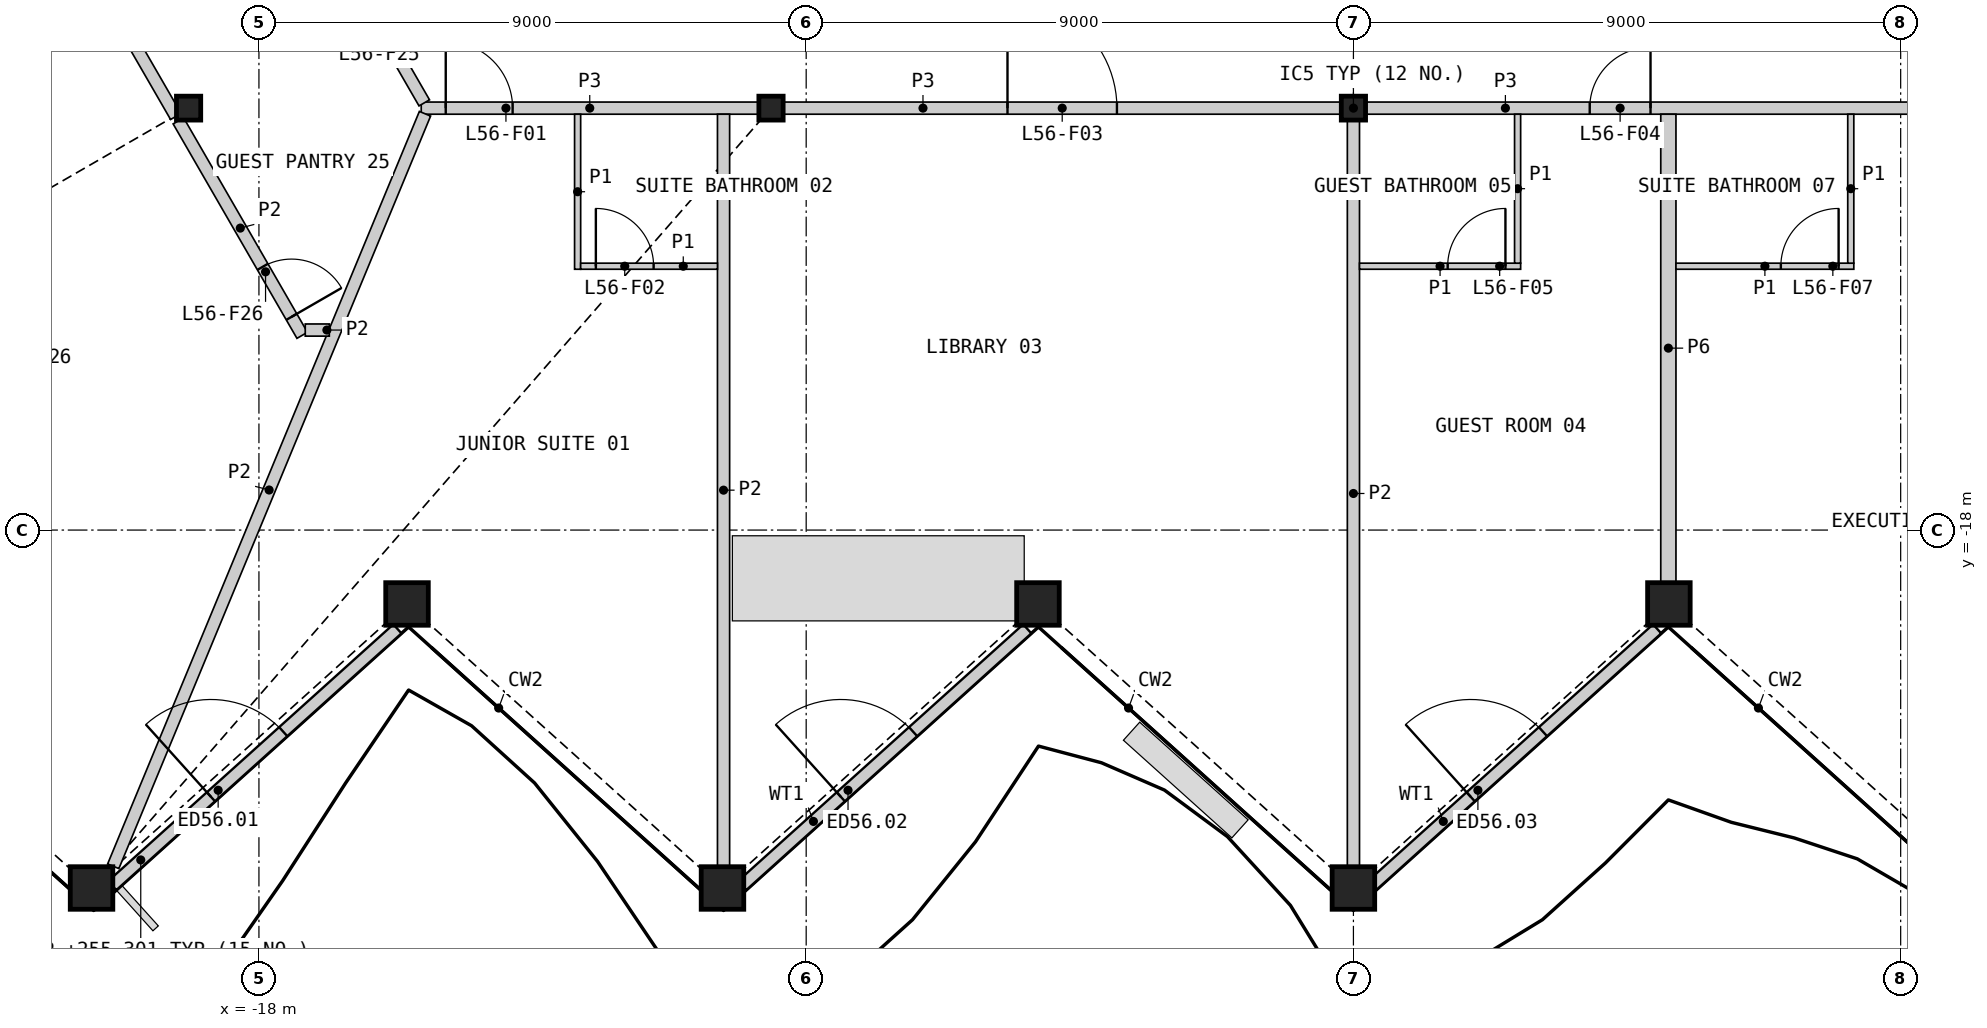
"""IFC4 building model, lengths in metres.
Left out: names, types, materials, properties, quantities, classifications, styles, units other than length and angle.
Written with IfcOpenShell. Run it as: python <this file> out.ifc"""

import sys

from ifc_helpers import new_model, si_unit, direction, frame, frame_2d, origin, origin_2d, place, context, subcontext, project, spatial, rectangle, hollow_rectangle, i_section, extrude, element, fill, save


model = new_model("IFC4")
c1 = context("Model", 3, precision=1e-05, world=origin(), true_north=direction((0.0, 1.0)))
c2 = subcontext(c1, "Body", "Model", "MODEL_VIEW")
j1 = project(units=[si_unit("LENGTHUNIT", "METRE"), si_unit("PLANEANGLEUNIT", "RADIAN")], contexts=[c1])
p1 = place(None, origin())
s1 = spatial("IfcSite", under=j1, at=p1, CompositionType="ELEMENT")
p2 = place(p1, origin())
s2 = spatial("IfcBuilding", under=s1, at=p2, CompositionType="ELEMENT")
p3 = place(p2, frame((0.0, 0.0, 252.6)))
s3 = spatial("IfcBuildingStorey", under=s2, at=p3, CompositionType="ELEMENT", Elevation=252.6)
for number, where, z_axis, x_axis in (
    (1, (-20.753, -23.887, 0.0), (0.0, 0.0, 1.0), (1.0, 0.0, 0.0)),
    (2, (-15.565, -19.215, 0.0), (0.0, 0.0, 1.0), (1.0, 0.0, 0.0)),
    (3, (-10.376, -23.887, 0.0), (0.0, 0.0, 1.0), (1.0, 0.0, 0.0)),
    (4, (-5.188, -19.215, 0.0), (0.0, 0.0, 1.0), (1.0, 0.0, 0.0)),
    (5, (0.0, -23.887, 0.0), (0.0, 0.0, 1.0), (1.0, 0.0, 0.0)),
    (6, (5.188, -19.215, 0.0), (0.0, 0.0, 1.0), (1.0, 0.0, 0.0)),
):
    element("IfcColumn", number, at=place(p3, frame(where, z_axis=z_axis, x_axis=x_axis)), inside=s3, PredefinedType="COLUMN", context=c2, shape_type="SweptSolid", body=[
        extrude(hollow_rectangle(XDim=0.7, YDim=0.7, WallThickness=0.045, at=origin_2d()), origin(), (0.0, 0.0, 1.0), 3.6),
    ])
for number, where, z_axis, x_axis in (
    (7, (-19.157, -11.06, 0.0), (0.0, 0.0, 1.0), (1.0, 0.0, 0.0)),
    (8, (-9.578, -11.06, 0.0), (0.0, 0.0, 1.0), (1.0, 0.0, 0.0)),
    (9, (0.0, -11.06, 0.0), (0.0, 0.0, 1.0), (1.0, 0.0, 0.0)),
):
    element("IfcColumn", number, at=place(p3, frame(where, z_axis=z_axis, x_axis=x_axis)), inside=s3, PredefinedType="COLUMN", context=c2, shape_type="SweptSolid", body=[
        extrude(i_section(OverallWidth=0.399, OverallDepth=0.393, WebThickness=0.023, FlangeThickness=0.037, at=origin_2d()), origin(), (0.0, 0.0, 1.0), 3.6),
    ])
p4 = place(p3, frame((-20.413, -23.848, 0.0), z_axis=(0.0, 0.0, 1.0), x_axis=(0.74314024121, 0.669135697668, 0.0)))
e10 = element("IfcWall", 10, at=p4, inside=s3, PredefinedType="SOLIDWALL", context=c2, shape_type="SweptSolid", body=[
    extrude(rectangle(XDim=6.311, YDim=0.2, at=frame_2d((3.156, 0.0))), origin(), (0.0, 0.0, 1.0), 2.701),
])
p5 = place(p4, frame((2.184, 0.0, 0.0)))
e11 = element("IfcOpeningElement", 11, at=p5, cuts=e10, PredefinedType="OPENING", context=c2, shape_type="SweptSolid", body=[
    extrude(rectangle(XDim=1.6, YDim=2.4, at=frame_2d((0.8, 1.2))), frame((0.0, 0.11, 0.0), z_axis=(0.0, -1.0, 0.0), x_axis=(1.0, 0.0, 0.0)), (0.0, 0.0, 1.0), 0.22),
])
p6 = place(p3, frame((-10.054, -23.848, 0.0), z_axis=(0.0, 0.0, 1.0), x_axis=(0.74314024121, 0.669135697668, 0.0)))
e12 = element("IfcWall", 12, at=p6, inside=s3, PredefinedType="SOLIDWALL", context=c2, shape_type="SweptSolid", body=[
    extrude(rectangle(XDim=6.311, YDim=0.2, at=frame_2d((3.156, 0.0))), origin(), (0.0, 0.0, 1.0), 2.701),
])
p7 = place(p6, frame((2.184, 0.0, 0.0)))
e13 = element("IfcOpeningElement", 13, at=p7, cuts=e12, PredefinedType="OPENING", context=c2, shape_type="SweptSolid", body=[
    extrude(rectangle(XDim=1.6, YDim=2.4, at=frame_2d((0.8, 1.2))), frame((0.0, 0.11, 0.0), z_axis=(0.0, -1.0, 0.0), x_axis=(1.0, 0.0, 0.0)), (0.0, 0.0, 1.0), 0.22),
])
p8 = place(p3, frame((0.305, -23.848, 0.0), z_axis=(0.0, 0.0, 1.0), x_axis=(0.74314024121, 0.669135697668, 0.0)))
e14 = element("IfcWall", 14, at=p8, inside=s3, PredefinedType="SOLIDWALL", context=c2, shape_type="SweptSolid", body=[
    extrude(rectangle(XDim=6.311, YDim=0.2, at=frame_2d((3.156, 0.0))), origin(), (0.0, 0.0, 1.0), 2.701),
])
p9 = place(p8, frame((2.184, 0.0, 0.0)))
e15 = element("IfcOpeningElement", 15, at=p9, cuts=e14, PredefinedType="OPENING", context=c2, shape_type="SweptSolid", body=[
    extrude(rectangle(XDim=1.6, YDim=2.4, at=frame_2d((0.8, 1.2))), frame((0.0, 0.11, 0.0), z_axis=(0.0, -1.0, 0.0), x_axis=(1.0, 0.0, 0.0)), (0.0, 0.0, 1.0), 0.22),
])
p10 = place(p3, frame((-9.369, -11.06, 0.0), z_axis=(0.0, 0.0, 1.0), x_axis=(1.0, 0.0, 0.0)))
e16 = element("IfcWall", 16, at=p10, inside=s3, PredefinedType="PARTITIONING", context=c2, shape_type="SweptSolid", body=[
    extrude(rectangle(XDim=9.159, YDim=0.2, at=frame_2d((4.58, 0.0))), origin(), (0.0, 0.0, 1.0), 3.25),
])
p11 = place(p10, frame((3.68, 0.0, 0.0)))
e17 = element("IfcOpeningElement", 17, at=p11, cuts=e16, PredefinedType="OPENING", context=c2, shape_type="SweptSolid", body=[
    extrude(rectangle(XDim=1.8, YDim=2.1, at=frame_2d((0.9, 1.05))), frame((0.0, 0.11, 0.0), z_axis=(0.0, -1.0, 0.0), x_axis=(1.0, 0.0, 0.0)), (0.0, 0.0, 1.0), 0.22),
])
p12 = place(p3, frame((0.209, -11.06, 0.0), z_axis=(0.0, 0.0, 1.0), x_axis=(1.0, 0.0, 0.0)))
e18 = element("IfcWall", 18, at=p12, inside=s3, PredefinedType="PARTITIONING", context=c2, shape_type="SweptSolid", body=[
    extrude(rectangle(XDim=9.159, YDim=0.2, at=frame_2d((4.58, 0.0))), origin(), (0.0, 0.0, 1.0), 3.25),
])
p13 = place(p12, frame((3.677, 0.0, 0.0)))
e19 = element("IfcOpeningElement", 19, at=p13, cuts=e18, PredefinedType="OPENING", context=c2, shape_type="SweptSolid", body=[
    extrude(rectangle(XDim=1.0, YDim=2.1, at=frame_2d((0.5, 1.05))), frame((0.0, 0.11, 0.0), z_axis=(0.0, -1.0, 0.0), x_axis=(1.0, 0.0, 0.0)), (0.0, 0.0, 1.0), 0.22),
])
p14 = place(p3, frame((5.179, -18.855, 0.0), z_axis=(0.0, 0.0, 1.0), x_axis=(0.0, 1.0, 0.0)))
e20 = element("IfcWall", 20, at=p14, inside=s3, PredefinedType="PARTITIONING", context=c2, shape_type="SweptSolid", body=[
    extrude(rectangle(XDim=7.695, YDim=0.25, at=frame_2d((3.848, 0.0))), origin(), (0.0, 0.0, 1.0), 2.404),
])
p15 = place(p3, frame((-15.331, -11.06, 0.0), z_axis=(0.0, 0.0, 1.0), x_axis=(1.0, 0.0, 0.0)))
e21 = element("IfcWall", 21, at=p15, inside=s3, PredefinedType="PARTITIONING", context=c2, shape_type="SweptSolid", body=[
    extrude(rectangle(XDim=5.543, YDim=0.2, at=frame_2d((2.771, 0.0))), origin(), (0.0, 0.0, 1.0), 3.25),
])
p16 = place(p15, frame((0.403, 0.0, 0.0)))
e22 = element("IfcOpeningElement", 22, at=p16, cuts=e21, PredefinedType="OPENING", context=c2, shape_type="SweptSolid", body=[
    extrude(rectangle(XDim=1.1, YDim=2.1, at=frame_2d((0.55, 1.05))), frame((0.0, 0.11, 0.0), z_axis=(0.0, -1.0, 0.0), x_axis=(1.0, 0.0, 0.0)), (0.0, 0.0, 1.0), 0.22),
])
p17 = place(p3, frame((-17.144, -7.747, 0.0), z_axis=(0.0, 0.0, 1.0), x_axis=(0.499958791762, -0.866049194065, 0.0)))
e23 = element("IfcWall", 23, at=p17, inside=s3, PredefinedType="PARTITIONING", context=c2, shape_type="SweptSolid", body=[
    extrude(rectangle(XDim=3.726, YDim=0.2, at=frame_2d((1.863, 0.0))), origin(), (0.0, 0.0, 1.0), 3.25),
])
p18 = place(p17, frame((1.388, 0.0, 0.0)))
e24 = element("IfcOpeningElement", 24, at=p18, cuts=e23, PredefinedType="OPENING", context=c2, shape_type="SweptSolid", body=[
    extrude(rectangle(XDim=0.95, YDim=2.1, at=frame_2d((0.475, 1.05))), frame((0.0, 0.11, 0.0), z_axis=(0.0, -1.0, 0.0), x_axis=(1.0, 0.0, 0.0)), (0.0, 0.0, 1.0), 0.22),
])
p19 = place(p3, frame((-20.396, -23.53, 0.0), z_axis=(0.0, 0.0, 1.0), x_axis=(0.382692998932, 0.923875569851, 0.0)))
e25 = element("IfcWall", 25, at=p19, inside=s3, PredefinedType="PARTITIONING", context=c2, shape_type="SweptSolid", body=[
    extrude(rectangle(XDim=13.397, YDim=0.2, at=frame_2d((6.698, 0.0))), origin(), (0.0, 0.0, 1.0), 2.404),
])
p20 = place(p3, frame((-10.359, -23.527, 0.0), z_axis=(0.0, 0.0, 1.0), x_axis=(0.0, 1.0, 0.0)))
e26 = element("IfcWall", 26, at=p20, inside=s3, PredefinedType="PARTITIONING", context=c2, shape_type="SweptSolid", body=[
    extrude(rectangle(XDim=12.366, YDim=0.2, at=frame_2d((6.183, 0.0))), origin(), (0.0, 0.0, 1.0), 2.404),
])
p21 = place(p3, frame((0.0, -23.527, 0.0), z_axis=(0.0, 0.0, 1.0), x_axis=(0.0, 1.0, 0.0)))
e27 = element("IfcWall", 27, at=p21, inside=s3, PredefinedType="PARTITIONING", context=c2, shape_type="SweptSolid", body=[
    extrude(rectangle(XDim=12.257, YDim=0.2, at=frame_2d((6.128, 0.0))), origin(), (0.0, 0.0, 1.0), 2.404),
])
p22 = place(p3, frame((-21.458, -7.574, 0.0), z_axis=(0.0, 0.0, 1.0), x_axis=(0.499973304129, -0.866040816104, 0.0)))
e28 = element("IfcWall", 28, at=p22, inside=s3, PredefinedType="PARTITIONING", context=c2, shape_type="SweptSolid", body=[
    extrude(rectangle(XDim=4.184, YDim=0.2, at=frame_2d((2.092, 0.0))), origin(), (0.0, 0.0, 1.0), 2.404),
])
p23 = place(p3, frame((-19.325, -11.27, 0.0), z_axis=(0.0, 0.0, 1.0), x_axis=(0.500000928893, -0.866024867487, 0.0)))
e29 = element("IfcWall", 29, at=p23, inside=s3, PredefinedType="PARTITIONING", context=c2, shape_type="SweptSolid", body=[
    extrude(rectangle(XDim=4.073, YDim=0.2, at=frame_2d((2.036, 0.0))), origin(), (0.0, 0.0, 1.0), 2.404),
])
p24 = place(p23, frame((2.772, 0.0, 0.0)))
e30 = element("IfcOpeningElement", 30, at=p24, cuts=e29, PredefinedType="OPENING", context=c2, shape_type="SweptSolid", body=[
    extrude(rectangle(XDim=0.95, YDim=2.1, at=frame_2d((0.475, 1.05))), frame((0.0, 0.11, 0.0), z_axis=(0.0, -1.0, 0.0), x_axis=(1.0, 0.0, 0.0)), (0.0, 0.0, 1.0), 0.22),
])
p25 = place(p3, frame((-17.238, -14.71, 0.0), z_axis=(0.0, 0.0, 1.0), x_axis=(1.0, 0.0, 0.0)))
e31 = element("IfcWall", 31, at=p25, inside=s3, PredefinedType="PARTITIONING", context=c2, shape_type="SweptSolid", body=[
    extrude(rectangle(XDim=0.396, YDim=0.2, at=frame_2d((0.198, 0.0))), origin(), (0.0, 0.0, 1.0), 2.404),
])
p26 = place(p3, frame((5.304, -13.66, 0.0), z_axis=(0.0, 0.0, 1.0), x_axis=(1.0, 0.0, 0.0)))
e32 = element("IfcWall", 32, at=p26, inside=s3, PredefinedType="PARTITIONING", context=c2, shape_type="SweptSolid", body=[
    extrude(rectangle(XDim=2.925, YDim=0.1, at=frame_2d((1.462, 0.0))), origin(), (0.0, 0.0, 1.0), 2.404),
])
p27 = place(p26, frame((1.725, 0.0, 0.0)))
e33 = element("IfcOpeningElement", 33, at=p27, cuts=e32, PredefinedType="OPENING", context=c2, shape_type="SweptSolid", body=[
    extrude(rectangle(XDim=0.95, YDim=2.1, at=frame_2d((0.475, 1.05))), frame((0.0, 0.06, 0.0), z_axis=(0.0, -1.0, 0.0), x_axis=(1.0, 0.0, 0.0)), (0.0, 0.0, 1.0), 0.12),
])
p28 = place(p3, frame((0.1, -13.66, 0.0), z_axis=(0.0, 0.0, 1.0), x_axis=(1.0, 0.0, 0.0)))
e34 = element("IfcWall", 34, at=p28, inside=s3, PredefinedType="PARTITIONING", context=c2, shape_type="SweptSolid", body=[
    extrude(rectangle(XDim=2.65, YDim=0.1, at=frame_2d((1.325, 0.0))), origin(), (0.0, 0.0, 1.0), 2.404),
])
p29 = place(p28, frame((1.45, 0.0, 0.0)))
e35 = element("IfcOpeningElement", 35, at=p29, cuts=e34, PredefinedType="OPENING", context=c2, shape_type="SweptSolid", body=[
    extrude(rectangle(XDim=0.95, YDim=2.1, at=frame_2d((0.475, 1.05))), frame((0.0, 0.06, 0.0), z_axis=(0.0, -1.0, 0.0), x_axis=(1.0, 0.0, 0.0)), (0.0, 0.0, 1.0), 0.12),
])
p30 = place(p3, frame((-12.759, -13.71, 0.0), z_axis=(0.0, 0.0, 1.0), x_axis=(0.0, 1.0, 0.0)))
e36 = element("IfcWall", 36, at=p30, inside=s3, PredefinedType="PARTITIONING", context=c2, shape_type="SweptSolid", body=[
    extrude(rectangle(XDim=2.55, YDim=0.1, at=frame_2d((1.275, 0.0))), origin(), (0.0, 0.0, 1.0), 2.404),
])
for number, where, z_axis, x_axis in (
    (37, (2.7, -13.61, 0.0), (0.0, 0.0, 1.0), (0.0, 1.0, 0.0)),
    (38, (8.179, -13.61, 0.0), (0.0, 0.0, 1.0), (0.0, 1.0, 0.0)),
):
    element("IfcWall", number, at=place(p3, frame(where, z_axis=z_axis, x_axis=x_axis)), inside=s3, PredefinedType="PARTITIONING", context=c2, shape_type="SweptSolid", body=[
        extrude(rectangle(XDim=2.45, YDim=0.1, at=frame_2d((1.225, 0.0))), origin(), (0.0, 0.0, 1.0), 2.404),
    ])
p31 = place(p3, frame((-12.709, -13.66, 0.0), z_axis=(0.0, 0.0, 1.0), x_axis=(1.0, 0.0, 0.0)))
e39 = element("IfcWall", 39, at=p31, inside=s3, PredefinedType="PARTITIONING", context=c2, shape_type="SweptSolid", body=[
    extrude(rectangle(XDim=2.25, YDim=0.1, at=frame_2d((1.125, 0.0))), origin(), (0.0, 0.0, 1.0), 2.404),
])
p32 = place(p31, frame((0.25, 0.0, 0.0)))
e40 = element("IfcOpeningElement", 40, at=p32, cuts=e39, PredefinedType="OPENING", context=c2, shape_type="SweptSolid", body=[
    extrude(rectangle(XDim=0.95, YDim=2.1, at=frame_2d((0.475, 1.05))), frame((0.0, 0.06, 0.0), z_axis=(0.0, -1.0, 0.0), x_axis=(1.0, 0.0, 0.0)), (0.0, 0.0, 1.0), 0.12),
])
p33 = place(p5, origin())
e41 = element("IfcDoor", 41, at=p33, inside=s3, OperationType="DOUBLE_DOOR_SINGLE_SWING", PredefinedType="DOOR", context=c2, shape_type="SweptSolid", body=[
    extrude(rectangle(XDim=1.6, YDim=2.4, at=frame_2d((0.8, 1.2))), frame((0.0, 0.025, 0.0), z_axis=(0.0, -1.0, 0.0), x_axis=(1.0, 0.0, 0.0)), (0.0, 0.0, 1.0), 0.05),
])
fill(e11, e41)
p34 = place(p7, origin())
e42 = element("IfcDoor", 42, at=p34, inside=s3, OperationType="DOUBLE_DOOR_SINGLE_SWING", PredefinedType="DOOR", context=c2, shape_type="SweptSolid", body=[
    extrude(rectangle(XDim=1.6, YDim=2.4, at=frame_2d((0.8, 1.2))), frame((0.0, 0.025, 0.0), z_axis=(0.0, -1.0, 0.0), x_axis=(1.0, 0.0, 0.0)), (0.0, 0.0, 1.0), 0.05),
])
fill(e13, e42)
p35 = place(p9, origin())
e43 = element("IfcDoor", 43, at=p35, inside=s3, OperationType="DOUBLE_DOOR_SINGLE_SWING", PredefinedType="DOOR", context=c2, shape_type="SweptSolid", body=[
    extrude(rectangle(XDim=1.6, YDim=2.4, at=frame_2d((0.8, 1.2))), frame((0.0, 0.025, 0.0), z_axis=(0.0, -1.0, 0.0), x_axis=(1.0, 0.0, 0.0)), (0.0, 0.0, 1.0), 0.05),
])
fill(e15, e43)
p36 = place(p16, origin())
e44 = element("IfcDoor", 44, at=p36, inside=s3, OperationType="SINGLE_SWING_LEFT", PredefinedType="DOOR", context=c2, shape_type="SweptSolid", body=[
    extrude(rectangle(XDim=1.1, YDim=2.1, at=frame_2d((0.55, 1.05))), frame((0.0, 0.025, 0.0), z_axis=(0.0, -1.0, 0.0), x_axis=(1.0, 0.0, 0.0)), (0.0, 0.0, 1.0), 0.05),
])
fill(e22, e44)
p37 = place(p32, origin())
e45 = element("IfcDoor", 45, at=p37, inside=s3, OperationType="SINGLE_SWING_LEFT", PredefinedType="DOOR", context=c2, shape_type="SweptSolid", body=[
    extrude(rectangle(XDim=0.95, YDim=2.1, at=frame_2d((0.475, 1.05))), frame((0.0, 0.025, 0.0), z_axis=(0.0, -1.0, 0.0), x_axis=(1.0, 0.0, 0.0)), (0.0, 0.0, 1.0), 0.05),
])
fill(e40, e45)
p38 = place(p11, origin())
e46 = element("IfcDoor", 46, at=p38, inside=s3, OperationType="DOUBLE_DOOR_SINGLE_SWING", PredefinedType="DOOR", context=c2, shape_type="SweptSolid", body=[
    extrude(rectangle(XDim=1.8, YDim=2.1, at=frame_2d((0.9, 1.05))), frame((0.0, 0.025, 0.0), z_axis=(0.0, -1.0, 0.0), x_axis=(1.0, 0.0, 0.0)), (0.0, 0.0, 1.0), 0.05),
])
fill(e17, e46)
p39 = place(p13, origin())
e47 = element("IfcDoor", 47, at=p39, inside=s3, OperationType="SINGLE_SWING_RIGHT", PredefinedType="DOOR", context=c2, shape_type="SweptSolid", body=[
    extrude(rectangle(XDim=1.0, YDim=2.1, at=frame_2d((0.5, 1.05))), frame((0.0, 0.025, 0.0), z_axis=(0.0, -1.0, 0.0), x_axis=(1.0, 0.0, 0.0)), (0.0, 0.0, 1.0), 0.05),
])
fill(e19, e47)
p40 = place(p29, origin())
e48 = element("IfcDoor", 48, at=p40, inside=s3, OperationType="SINGLE_SWING_RIGHT", PredefinedType="DOOR", context=c2, shape_type="SweptSolid", body=[
    extrude(rectangle(XDim=0.95, YDim=2.1, at=frame_2d((0.475, 1.05))), frame((0.0, 0.025, 0.0), z_axis=(0.0, -1.0, 0.0), x_axis=(1.0, 0.0, 0.0)), (0.0, 0.0, 1.0), 0.05),
])
fill(e35, e48)
p41 = place(p27, origin())
e49 = element("IfcDoor", 49, at=p41, inside=s3, OperationType="SINGLE_SWING_RIGHT", PredefinedType="DOOR", context=c2, shape_type="SweptSolid", body=[
    extrude(rectangle(XDim=0.95, YDim=2.1, at=frame_2d((0.475, 1.05))), frame((0.0, 0.025, 0.0), z_axis=(0.0, -1.0, 0.0), x_axis=(1.0, 0.0, 0.0)), (0.0, 0.0, 1.0), 0.05),
])
fill(e33, e49)
p42 = place(p24, origin())
e50 = element("IfcDoor", 50, at=p42, inside=s3, OperationType="SINGLE_SWING_RIGHT", PredefinedType="DOOR", context=c2, shape_type="SweptSolid", body=[
    extrude(rectangle(XDim=0.95, YDim=2.1, at=frame_2d((0.475, 1.05))), frame((0.0, 0.025, 0.0), z_axis=(0.0, -1.0, 0.0), x_axis=(1.0, 0.0, 0.0)), (0.0, 0.0, 1.0), 0.05),
])
fill(e30, e50)
save(model, sys.argv[1])
